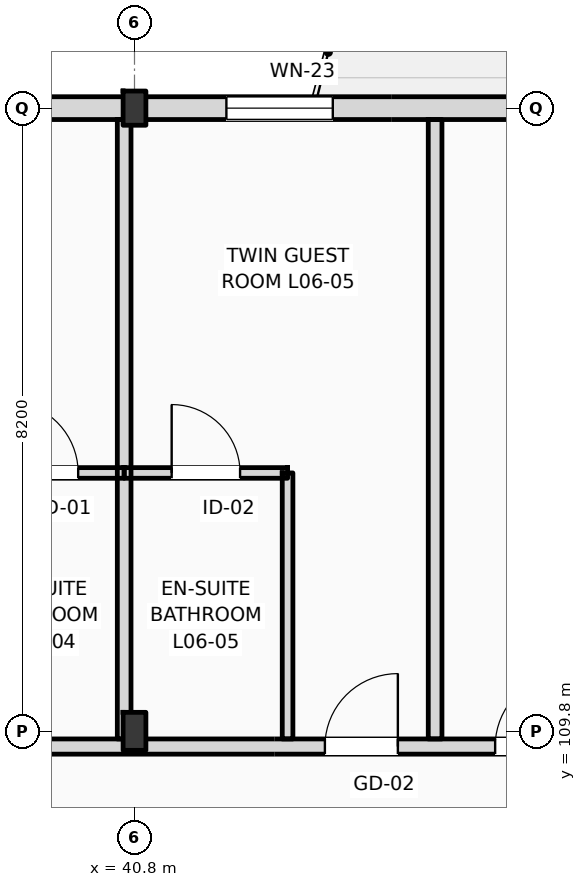
"""IFC4 building model, lengths in metres.
Left out: names, types, materials, properties, quantities, classifications, styles, units other than length and angle.
Written with IfcOpenShell. Run it as: python <this file> out.ifc"""

import sys

from ifc_helpers import new_model, si_unit, direction, frame, frame_2d, origin, origin_2d, place, context, subcontext, project, spatial, rectangle, i_section, extrude, element, fill, save


model = new_model("IFC4")
c1 = context("Model", 3, precision=1e-05, world=origin(), true_north=direction((0.0, 1.0)))
c2 = subcontext(c1, "Body", "Model", "MODEL_VIEW")
j1 = project(units=[si_unit("LENGTHUNIT", "METRE"), si_unit("PLANEANGLEUNIT", "RADIAN")], contexts=[c1])
p1 = place(None, origin())
s1 = spatial("IfcSite", under=j1, at=p1, CompositionType="ELEMENT")
p2 = place(p1, origin())
s2 = spatial("IfcBuilding", under=s1, at=p2, CompositionType="ELEMENT")
p3 = place(p2, frame((0.0, 0.0, 28.2)))
s3 = spatial("IfcBuildingStorey", under=s2, at=p3, CompositionType="ELEMENT", Elevation=28.2)
p4 = place(p3, frame((40.8, 109.8, 0.0), z_axis=(0.0, 0.0, 1.0), x_axis=(1.0, 0.0, 0.0)))
e1 = element("IfcColumn", 1, at=p4, inside=s3, PredefinedType="COLUMN", context=c2, shape_type="SweptSolid", body=[
    extrude(i_section(OverallWidth=0.3, OverallDepth=0.5, WebThickness=0.014, FlangeThickness=0.028, FilletRadius=0.027, at=origin_2d()), origin(), (0.0, 0.0, 1.0), 3.6),
])
p5 = place(p3, frame((40.8, 118.0, 0.0), z_axis=(0.0, 0.0, 1.0), x_axis=(1.0, 0.0, 0.0)))
e2 = element("IfcColumn", 2, at=p5, inside=s3, PredefinedType="COLUMN", context=c2, shape_type="SweptSolid", body=[
    extrude(i_section(OverallWidth=0.3, OverallDepth=0.45, WebThickness=0.014, FlangeThickness=0.026, FilletRadius=0.027, at=origin_2d()), origin(), (0.0, 0.0, 1.0), 3.6),
])
p6 = place(p3, frame((22.5, 118.0, 0.0), z_axis=(0.0, 0.0, 1.0), x_axis=(1.0, 0.0, 0.0)))
e3 = element("IfcWall", 3, at=p6, inside=s3, PredefinedType="STANDARD", context=c2, shape_type="SweptSolid", body=[
    extrude(rectangle(XDim=97.5, YDim=0.3, at=frame_2d((48.75, 0.0))), origin(), (0.0, 0.0, 1.0), 2.8),
])
p7 = place(p6, frame((0.91, 0.0, 0.9)))
e4 = element("IfcOpeningElement", 4, at=p7, cuts=e3, PredefinedType="OPENING", context=c2, shape_type="SweptSolid", body=[
    extrude(rectangle(XDim=0.9, YDim=1.72, at=frame_2d((0.45, 0.86))), frame((0.0, 0.16, 0.0), z_axis=(0.0, -1.0, 0.0), x_axis=(1.0, 0.0, 0.0)), (0.0, 0.0, 1.0), 0.32),
])
p8 = place(p6, frame((6.561, 0.0, 0.0)))
e5 = element("IfcOpeningElement", 5, at=p8, cuts=e3, PredefinedType="OPENING", context=c2, shape_type="SweptSolid", body=[
    extrude(rectangle(XDim=1.2, YDim=2.25, at=frame_2d((0.6, 1.125))), frame((0.0, 0.16, 0.0), z_axis=(0.0, -1.0, 0.0), x_axis=(1.0, 0.0, 0.0)), (0.0, 0.0, 1.0), 0.32),
])
p9 = place(p6, frame((11.477, 0.0, 0.9)))
e6 = element("IfcOpeningElement", 6, at=p9, cuts=e3, PredefinedType="OPENING", context=c2, shape_type="SweptSolid", body=[
    extrude(rectangle(XDim=1.1, YDim=1.5, at=frame_2d((0.55, 0.75))), frame((0.0, 0.16, 0.0), z_axis=(0.0, -1.0, 0.0), x_axis=(1.0, 0.0, 0.0)), (0.0, 0.0, 1.0), 0.32),
])
p10 = place(p6, frame((15.194, 0.0, 0.9)))
e7 = element("IfcOpeningElement", 7, at=p10, cuts=e3, PredefinedType="OPENING", context=c2, shape_type="SweptSolid", body=[
    extrude(rectangle(XDim=1.25, YDim=1.6, at=frame_2d((0.625, 0.8))), frame((0.0, 0.16, 0.0), z_axis=(0.0, -1.0, 0.0), x_axis=(1.0, 0.0, 0.0)), (0.0, 0.0, 1.0), 0.32),
])
p11 = place(p6, frame((19.509, 0.0, 0.9)))
e8 = element("IfcOpeningElement", 8, at=p11, cuts=e3, PredefinedType="OPENING", context=c2, shape_type="SweptSolid", body=[
    extrude(rectangle(XDim=1.4, YDim=1.7, at=frame_2d((0.7, 0.85))), frame((0.0, 0.16, 0.0), z_axis=(0.0, -1.0, 0.0), x_axis=(1.0, 0.0, 0.0)), (0.0, 0.0, 1.0), 0.32),
])
p12 = place(p6, frame((23.258, 0.0, 0.0)))
e9 = element("IfcOpeningElement", 9, at=p12, cuts=e3, PredefinedType="OPENING", context=c2, shape_type="SweptSolid", body=[
    extrude(rectangle(XDim=1.2, YDim=2.25, at=frame_2d((0.6, 1.125))), frame((0.0, 0.16, 0.0), z_axis=(0.0, -1.0, 0.0), x_axis=(1.0, 0.0, 0.0)), (0.0, 0.0, 1.0), 0.32),
])
p13 = place(p6, frame((28.115, 0.0, 0.9)))
e10 = element("IfcOpeningElement", 10, at=p13, cuts=e3, PredefinedType="OPENING", context=c2, shape_type="SweptSolid", body=[
    extrude(rectangle(XDim=1.75, YDim=1.72, at=frame_2d((0.875, 0.86))), frame((0.0, 0.16, 0.0), z_axis=(0.0, -1.0, 0.0), x_axis=(1.0, 0.0, 0.0)), (0.0, 0.0, 1.0), 0.32),
])
p14 = place(p6, frame((31.582, 0.0, 0.9)))
e11 = element("IfcOpeningElement", 11, at=p14, cuts=e3, PredefinedType="OPENING", context=c2, shape_type="SweptSolid", body=[
    extrude(rectangle(XDim=1.35, YDim=1.72, at=frame_2d((0.675, 0.86))), frame((0.0, 0.16, 0.0), z_axis=(0.0, -1.0, 0.0), x_axis=(1.0, 0.0, 0.0)), (0.0, 0.0, 1.0), 0.32),
])
p15 = place(p6, frame((37.379, 0.0, 0.0)))
e12 = element("IfcOpeningElement", 12, at=p15, cuts=e3, PredefinedType="OPENING", context=c2, shape_type="SweptSolid", body=[
    extrude(rectangle(XDim=1.2, YDim=2.25, at=frame_2d((0.6, 1.125))), frame((0.0, 0.16, 0.0), z_axis=(0.0, -1.0, 0.0), x_axis=(1.0, 0.0, 0.0)), (0.0, 0.0, 1.0), 0.32),
])
p16 = place(p6, frame((42.663, 0.0, 0.9)))
e13 = element("IfcOpeningElement", 13, at=p16, cuts=e3, PredefinedType="OPENING", context=c2, shape_type="SweptSolid", body=[
    extrude(rectangle(XDim=1.35, YDim=1.72, at=frame_2d((0.675, 0.86))), frame((0.0, 0.16, 0.0), z_axis=(0.0, -1.0, 0.0), x_axis=(1.0, 0.0, 0.0)), (0.0, 0.0, 1.0), 0.32),
])
p17 = place(p6, frame((45.119, 0.0, 0.9)))
e14 = element("IfcOpeningElement", 14, at=p17, cuts=e3, PredefinedType="OPENING", context=c2, shape_type="SweptSolid", body=[
    extrude(rectangle(XDim=2.871, YDim=1.72, at=frame_2d((1.436, 0.86))), frame((0.0, 0.16, 0.0), z_axis=(0.0, -1.0, 0.0), x_axis=(1.0, 0.0, 0.0)), (0.0, 0.0, 1.0), 0.32),
])
p18 = place(p6, frame((50.41, 0.0, 0.9)))
e15 = element("IfcOpeningElement", 15, at=p18, cuts=e3, PredefinedType="OPENING", context=c2, shape_type="SweptSolid", body=[
    extrude(rectangle(XDim=1.8, YDim=1.72, at=frame_2d((0.9, 0.86))), frame((0.0, 0.16, 0.0), z_axis=(0.0, -1.0, 0.0), x_axis=(1.0, 0.0, 0.0)), (0.0, 0.0, 1.0), 0.32),
])
p19 = place(p6, frame((54.375, 0.0, 0.0)))
e16 = element("IfcOpeningElement", 16, at=p19, cuts=e3, PredefinedType="OPENING", context=c2, shape_type="SweptSolid", body=[
    extrude(rectangle(XDim=1.2, YDim=2.25, at=frame_2d((0.6, 1.125))), frame((0.0, 0.16, 0.0), z_axis=(0.0, -1.0, 0.0), x_axis=(1.0, 0.0, 0.0)), (0.0, 0.0, 1.0), 0.32),
])
p20 = place(p6, frame((59.052, 0.0, 0.9)))
e17 = element("IfcOpeningElement", 17, at=p20, cuts=e3, PredefinedType="OPENING", context=c2, shape_type="SweptSolid", body=[
    extrude(rectangle(XDim=1.35, YDim=1.72, at=frame_2d((0.675, 0.86))), frame((0.0, 0.16, 0.0), z_axis=(0.0, -1.0, 0.0), x_axis=(1.0, 0.0, 0.0)), (0.0, 0.0, 1.0), 0.32),
])
p21 = place(p6, frame((62.768, 0.0, 0.9)))
e18 = element("IfcOpeningElement", 18, at=p21, cuts=e3, PredefinedType="OPENING", context=c2, shape_type="SweptSolid", body=[
    extrude(rectangle(XDim=1.5, YDim=1.72, at=frame_2d((0.75, 0.86))), frame((0.0, 0.16, 0.0), z_axis=(0.0, -1.0, 0.0), x_axis=(1.0, 0.0, 0.0)), (0.0, 0.0, 1.0), 0.32),
])
p22 = place(p6, frame((68.498, 0.0, 0.0)))
e19 = element("IfcOpeningElement", 19, at=p22, cuts=e3, PredefinedType="OPENING", context=c2, shape_type="SweptSolid", body=[
    extrude(rectangle(XDim=1.2, YDim=2.25, at=frame_2d((0.6, 1.125))), frame((0.0, 0.16, 0.0), z_axis=(0.0, -1.0, 0.0), x_axis=(1.0, 0.0, 0.0)), (0.0, 0.0, 1.0), 0.32),
])
p23 = place(p6, frame((71.265, 0.0, 0.9)))
e20 = element("IfcOpeningElement", 20, at=p23, cuts=e3, PredefinedType="OPENING", context=c2, shape_type="SweptSolid", body=[
    extrude(rectangle(XDim=0.9, YDim=1.72, at=frame_2d((0.45, 0.86))), frame((0.0, 0.16, 0.0), z_axis=(0.0, -1.0, 0.0), x_axis=(1.0, 0.0, 0.0)), (0.0, 0.0, 1.0), 0.32),
])
p24 = place(p6, frame((76.316, 0.0, 0.9)))
e21 = element("IfcOpeningElement", 21, at=p24, cuts=e3, PredefinedType="OPENING", context=c2, shape_type="SweptSolid", body=[
    extrude(rectangle(XDim=1.95, YDim=1.72, at=frame_2d((0.975, 0.86))), frame((0.0, 0.16, 0.0), z_axis=(0.0, -1.0, 0.0), x_axis=(1.0, 0.0, 0.0)), (0.0, 0.0, 1.0), 0.32),
])
p25 = place(p6, frame((81.632, 0.0, 0.9)))
e22 = element("IfcOpeningElement", 22, at=p25, cuts=e3, PredefinedType="OPENING", context=c2, shape_type="SweptSolid", body=[
    extrude(rectangle(XDim=1.35, YDim=1.72, at=frame_2d((0.675, 0.86))), frame((0.0, 0.16, 0.0), z_axis=(0.0, -1.0, 0.0), x_axis=(1.0, 0.0, 0.0)), (0.0, 0.0, 1.0), 0.32),
])
p26 = place(p6, frame((84.948, 0.0, 0.9)))
e23 = element("IfcOpeningElement", 23, at=p26, cuts=e3, PredefinedType="OPENING", context=c2, shape_type="SweptSolid", body=[
    extrude(rectangle(XDim=2.25, YDim=1.72, at=frame_2d((1.125, 0.86))), frame((0.0, 0.16, 0.0), z_axis=(0.0, -1.0, 0.0), x_axis=(1.0, 0.0, 0.0)), (0.0, 0.0, 1.0), 0.32),
])
p27 = place(p6, frame((90.063, 0.0, 0.9)))
e24 = element("IfcOpeningElement", 24, at=p27, cuts=e3, PredefinedType="OPENING", context=c2, shape_type="SweptSolid", body=[
    extrude(rectangle(XDim=1.8, YDim=1.72, at=frame_2d((0.9, 0.86))), frame((0.0, 0.16, 0.0), z_axis=(0.0, -1.0, 0.0), x_axis=(1.0, 0.0, 0.0)), (0.0, 0.0, 1.0), 0.32),
])
p28 = place(p6, frame((93.529, 0.0, 0.9)))
e25 = element("IfcOpeningElement", 25, at=p28, cuts=e3, PredefinedType="OPENING", context=c2, shape_type="SweptSolid", body=[
    extrude(rectangle(XDim=2.55, YDim=1.72, at=frame_2d((1.275, 0.86))), frame((0.0, 0.16, 0.0), z_axis=(0.0, -1.0, 0.0), x_axis=(1.0, 0.0, 0.0)), (0.0, 0.0, 1.0), 0.32),
])
p29 = place(p3, frame((10.65, 109.6, 0.0), z_axis=(0.0, 0.0, 1.0), x_axis=(1.0, 0.0, 0.0)))
e26 = element("IfcWall", 26, at=p29, inside=s3, PredefinedType="PARTITIONING", context=c2, shape_type="SweptSolid", body=[
    extrude(rectangle(XDim=109.21, YDim=0.2, at=frame_2d((54.605, 0.0))), origin(), (0.0, 0.0, 1.0), 2.8),
])
p30 = place(p29, frame((12.611, 0.0, 0.0)))
e27 = element("IfcOpeningElement", 27, at=p30, cuts=e26, PredefinedType="OPENING", context=c2, shape_type="SweptSolid", body=[
    extrude(rectangle(XDim=1.02, YDim=2.2, at=frame_2d((0.51, 1.1))), frame((0.0, 0.11, 0.0), z_axis=(0.0, -1.0, 0.0), x_axis=(1.0, 0.0, 0.0)), (0.0, 0.0, 1.0), 0.22),
])
p31 = place(p29, frame((19.451, 0.0, 0.0)))
e28 = element("IfcOpeningElement", 28, at=p31, cuts=e26, PredefinedType="OPENING", context=c2, shape_type="SweptSolid", body=[
    extrude(rectangle(XDim=1.02, YDim=2.2, at=frame_2d((0.51, 1.1))), frame((0.0, 0.11, 0.0), z_axis=(0.0, -1.0, 0.0), x_axis=(1.0, 0.0, 0.0)), (0.0, 0.0, 1.0), 0.22),
])
p32 = place(p29, frame((23.842, 0.0, 0.0)))
e29 = element("IfcOpeningElement", 29, at=p32, cuts=e26, PredefinedType="OPENING", context=c2, shape_type="SweptSolid", body=[
    extrude(rectangle(XDim=1.02, YDim=2.2, at=frame_2d((0.51, 1.1))), frame((0.0, 0.11, 0.0), z_axis=(0.0, -1.0, 0.0), x_axis=(1.0, 0.0, 0.0)), (0.0, 0.0, 1.0), 0.22),
])
p33 = place(p29, frame((26.084, 0.0, 0.0)))
e30 = element("IfcOpeningElement", 30, at=p33, cuts=e26, PredefinedType="OPENING", context=c2, shape_type="SweptSolid", body=[
    extrude(rectangle(XDim=1.02, YDim=2.2, at=frame_2d((0.51, 1.1))), frame((0.0, 0.11, 0.0), z_axis=(0.0, -1.0, 0.0), x_axis=(1.0, 0.0, 0.0)), (0.0, 0.0, 1.0), 0.22),
])
p34 = place(p29, frame((32.655, 0.0, 0.0)))
e31 = element("IfcOpeningElement", 31, at=p34, cuts=e26, PredefinedType="OPENING", context=c2, shape_type="SweptSolid", body=[
    extrude(rectangle(XDim=0.96, YDim=2.2, at=frame_2d((0.48, 1.1))), frame((0.0, 0.11, 0.0), z_axis=(0.0, -1.0, 0.0), x_axis=(1.0, 0.0, 0.0)), (0.0, 0.0, 1.0), 0.22),
])
p35 = place(p29, frame((34.895, 0.0, 0.0)))
e32 = element("IfcOpeningElement", 32, at=p35, cuts=e26, PredefinedType="OPENING", context=c2, shape_type="SweptSolid", body=[
    extrude(rectangle(XDim=0.96, YDim=2.2, at=frame_2d((0.48, 1.1))), frame((0.0, 0.11, 0.0), z_axis=(0.0, -1.0, 0.0), x_axis=(1.0, 0.0, 0.0)), (0.0, 0.0, 1.0), 0.22),
])
p36 = place(p29, frame((41.436, 0.0, 0.0)))
e33 = element("IfcOpeningElement", 33, at=p36, cuts=e26, PredefinedType="OPENING", context=c2, shape_type="SweptSolid", body=[
    extrude(rectangle(XDim=0.96, YDim=2.2, at=frame_2d((0.48, 1.1))), frame((0.0, 0.11, 0.0), z_axis=(0.0, -1.0, 0.0), x_axis=(1.0, 0.0, 0.0)), (0.0, 0.0, 1.0), 0.22),
])
p37 = place(p29, frame((43.427, 0.0, 0.0)))
e34 = element("IfcOpeningElement", 34, at=p37, cuts=e26, PredefinedType="OPENING", context=c2, shape_type="SweptSolid", body=[
    extrude(rectangle(XDim=0.96, YDim=2.2, at=frame_2d((0.48, 1.1))), frame((0.0, 0.11, 0.0), z_axis=(0.0, -1.0, 0.0), x_axis=(1.0, 0.0, 0.0)), (0.0, 0.0, 1.0), 0.22),
])
p38 = place(p29, frame((50.218, 0.0, 0.0)))
e35 = element("IfcOpeningElement", 35, at=p38, cuts=e26, PredefinedType="OPENING", context=c2, shape_type="SweptSolid", body=[
    extrude(rectangle(XDim=0.96, YDim=2.2, at=frame_2d((0.48, 1.1))), frame((0.0, 0.11, 0.0), z_axis=(0.0, -1.0, 0.0), x_axis=(1.0, 0.0, 0.0)), (0.0, 0.0, 1.0), 0.22),
])
p39 = place(p29, frame((54.859, 0.0, 0.0)))
e36 = element("IfcOpeningElement", 36, at=p39, cuts=e26, PredefinedType="OPENING", context=c2, shape_type="SweptSolid", body=[
    extrude(rectangle(XDim=0.96, YDim=2.2, at=frame_2d((0.48, 1.1))), frame((0.0, 0.11, 0.0), z_axis=(0.0, -1.0, 0.0), x_axis=(1.0, 0.0, 0.0)), (0.0, 0.0, 1.0), 0.22),
])
p40 = place(p29, frame((59.0, 0.0, 0.0)))
e37 = element("IfcOpeningElement", 37, at=p40, cuts=e26, PredefinedType="OPENING", context=c2, shape_type="SweptSolid", body=[
    extrude(rectangle(XDim=0.96, YDim=2.2, at=frame_2d((0.48, 1.1))), frame((0.0, 0.11, 0.0), z_axis=(0.0, -1.0, 0.0), x_axis=(1.0, 0.0, 0.0)), (0.0, 0.0, 1.0), 0.22),
])
p41 = place(p29, frame((63.39, 0.0, 0.0)))
e38 = element("IfcOpeningElement", 38, at=p41, cuts=e26, PredefinedType="OPENING", context=c2, shape_type="SweptSolid", body=[
    extrude(rectangle(XDim=0.96, YDim=2.2, at=frame_2d((0.48, 1.1))), frame((0.0, 0.11, 0.0), z_axis=(0.0, -1.0, 0.0), x_axis=(1.0, 0.0, 0.0)), (0.0, 0.0, 1.0), 0.22),
])
p42 = place(p29, frame((65.631, 0.0, 0.0)))
e39 = element("IfcOpeningElement", 39, at=p42, cuts=e26, PredefinedType="OPENING", context=c2, shape_type="SweptSolid", body=[
    extrude(rectangle(XDim=0.96, YDim=2.2, at=frame_2d((0.48, 1.1))), frame((0.0, 0.11, 0.0), z_axis=(0.0, -1.0, 0.0), x_axis=(1.0, 0.0, 0.0)), (0.0, 0.0, 1.0), 0.22),
])
p43 = place(p29, frame((72.172, 0.0, 0.0)))
e40 = element("IfcOpeningElement", 40, at=p43, cuts=e26, PredefinedType="OPENING", context=c2, shape_type="SweptSolid", body=[
    extrude(rectangle(XDim=0.96, YDim=2.2, at=frame_2d((0.48, 1.1))), frame((0.0, 0.11, 0.0), z_axis=(0.0, -1.0, 0.0), x_axis=(1.0, 0.0, 0.0)), (0.0, 0.0, 1.0), 0.22),
])
p44 = place(p29, frame((74.413, 0.0, 0.0)))
e41 = element("IfcOpeningElement", 41, at=p44, cuts=e26, PredefinedType="OPENING", context=c2, shape_type="SweptSolid", body=[
    extrude(rectangle(XDim=0.96, YDim=2.2, at=frame_2d((0.48, 1.1))), frame((0.0, 0.11, 0.0), z_axis=(0.0, -1.0, 0.0), x_axis=(1.0, 0.0, 0.0)), (0.0, 0.0, 1.0), 0.22),
])
p45 = place(p29, frame((80.954, 0.0, 0.0)))
e42 = element("IfcOpeningElement", 42, at=p45, cuts=e26, PredefinedType="OPENING", context=c2, shape_type="SweptSolid", body=[
    extrude(rectangle(XDim=0.96, YDim=2.2, at=frame_2d((0.48, 1.1))), frame((0.0, 0.11, 0.0), z_axis=(0.0, -1.0, 0.0), x_axis=(1.0, 0.0, 0.0)), (0.0, 0.0, 1.0), 0.22),
])
p46 = place(p29, frame((83.195, 0.0, 0.0)))
e43 = element("IfcOpeningElement", 43, at=p46, cuts=e26, PredefinedType="OPENING", context=c2, shape_type="SweptSolid", body=[
    extrude(rectangle(XDim=0.96, YDim=2.2, at=frame_2d((0.48, 1.1))), frame((0.0, 0.11, 0.0), z_axis=(0.0, -1.0, 0.0), x_axis=(1.0, 0.0, 0.0)), (0.0, 0.0, 1.0), 0.22),
])
p47 = place(p29, frame((89.735, 0.0, 0.0)))
e44 = element("IfcOpeningElement", 44, at=p47, cuts=e26, PredefinedType="OPENING", context=c2, shape_type="SweptSolid", body=[
    extrude(rectangle(XDim=0.96, YDim=2.2, at=frame_2d((0.48, 1.1))), frame((0.0, 0.11, 0.0), z_axis=(0.0, -1.0, 0.0), x_axis=(1.0, 0.0, 0.0)), (0.0, 0.0, 1.0), 0.22),
])
p48 = place(p29, frame((94.126, 0.0, 0.0)))
e45 = element("IfcOpeningElement", 45, at=p48, cuts=e26, PredefinedType="OPENING", context=c2, shape_type="SweptSolid", body=[
    extrude(rectangle(XDim=0.96, YDim=2.2, at=frame_2d((0.48, 1.1))), frame((0.0, 0.11, 0.0), z_axis=(0.0, -1.0, 0.0), x_axis=(1.0, 0.0, 0.0)), (0.0, 0.0, 1.0), 0.22),
])
p49 = place(p29, frame((98.517, 0.0, 0.0)))
e46 = element("IfcOpeningElement", 46, at=p49, cuts=e26, PredefinedType="OPENING", context=c2, shape_type="SweptSolid", body=[
    extrude(rectangle(XDim=0.96, YDim=2.2, at=frame_2d((0.48, 1.1))), frame((0.0, 0.11, 0.0), z_axis=(0.0, -1.0, 0.0), x_axis=(1.0, 0.0, 0.0)), (0.0, 0.0, 1.0), 0.22),
])
p50 = place(p29, frame((102.908, 0.0, 0.0)))
e47 = element("IfcOpeningElement", 47, at=p50, cuts=e26, PredefinedType="OPENING", context=c2, shape_type="SweptSolid", body=[
    extrude(rectangle(XDim=0.96, YDim=2.2, at=frame_2d((0.48, 1.1))), frame((0.0, 0.11, 0.0), z_axis=(0.0, -1.0, 0.0), x_axis=(1.0, 0.0, 0.0)), (0.0, 0.0, 1.0), 0.22),
])
p51 = place(p29, frame((105.099, 0.0, 0.0)))
e48 = element("IfcOpeningElement", 48, at=p51, cuts=e26, PredefinedType="OPENING", context=c2, shape_type="SweptSolid", body=[
    extrude(rectangle(XDim=0.96, YDim=2.2, at=frame_2d((0.48, 1.1))), frame((0.0, 0.11, 0.0), z_axis=(0.0, -1.0, 0.0), x_axis=(1.0, 0.0, 0.0)), (0.0, 0.0, 1.0), 0.22),
])
p52 = place(p29, frame((2.716, 0.0, 0.0)))
e49 = element("IfcOpeningElement", 49, at=p52, cuts=e26, PredefinedType="OPENING", context=c2, shape_type="SweptSolid", body=[
    extrude(rectangle(XDim=1.35, YDim=2.25, at=frame_2d((0.675, 1.125))), frame((0.0, 0.11, 0.0), z_axis=(0.0, -1.0, 0.0), x_axis=(1.0, 0.0, 0.0)), (0.0, 0.0, 1.0), 0.22),
])
p53 = place(p29, frame((6.65, 0.0, 0.0)))
e50 = element("IfcOpeningElement", 50, at=p53, cuts=e26, PredefinedType="OPENING", context=c2, shape_type="SweptSolid", body=[
    extrude(rectangle(XDim=1.35, YDim=2.25, at=frame_2d((0.675, 1.125))), frame((0.0, 0.11, 0.0), z_axis=(0.0, -1.0, 0.0), x_axis=(1.0, 0.0, 0.0)), (0.0, 0.0, 1.0), 0.22),
])
p54 = place(p29, frame((10.583, 0.0, 0.0)))
e51 = element("IfcOpeningElement", 51, at=p54, cuts=e26, PredefinedType="OPENING", context=c2, shape_type="SweptSolid", body=[
    extrude(rectangle(XDim=1.35, YDim=2.25, at=frame_2d((0.675, 1.125))), frame((0.0, 0.11, 0.0), z_axis=(0.0, -1.0, 0.0), x_axis=(1.0, 0.0, 0.0)), (0.0, 0.0, 1.0), 0.22),
])
p55 = place(p3, frame((40.664, 109.7, 0.0), z_axis=(0.0, 0.0, 1.0), x_axis=(0.0, 1.0, 0.0)))
e52 = element("IfcWall", 52, at=p55, inside=s3, PredefinedType="PARTITIONING", context=c2, shape_type="SweptSolid", body=[
    extrude(rectangle(XDim=8.15, YDim=0.18, at=frame_2d((4.075, 0.0))), origin(), (0.0, 0.0, 1.0), 2.99),
])
p56 = place(p3, frame((38.514, 113.2, 0.0), z_axis=(0.0, 0.0, 1.0), x_axis=(1.0, 0.0, 0.0)))
e53 = element("IfcWall", 53, at=p56, inside=s3, PredefinedType="PARTITIONING", context=c2, shape_type="SweptSolid", body=[
    extrude(rectangle(XDim=2.15, YDim=0.14, at=frame_2d((1.075, 0.0))), origin(), (0.0, 0.0, 1.0), 3.36),
])
p57 = place(p56, frame((0.605, 0.0, 0.0)))
e54 = element("IfcOpeningElement", 54, at=p57, cuts=e53, PredefinedType="OPENING", context=c2, shape_type="SweptSolid", body=[
    extrude(rectangle(XDim=0.94, YDim=2.15, at=frame_2d((0.47, 1.075))), frame((0.0, 0.08, 0.0), z_axis=(0.0, -1.0, 0.0), x_axis=(1.0, 0.0, 0.0)), (0.0, 0.0, 1.0), 0.16),
])
p58 = place(p3, frame((44.755, 109.7, 0.0), z_axis=(0.0, 0.0, 1.0), x_axis=(0.0, 1.0, 0.0)))
e55 = element("IfcWall", 55, at=p58, inside=s3, PredefinedType="PARTITIONING", context=c2, shape_type="SweptSolid", body=[
    extrude(rectangle(XDim=8.15, YDim=0.18, at=frame_2d((4.075, 0.0))), origin(), (0.0, 0.0, 1.0), 3.36),
])
p59 = place(p3, frame((42.814, 109.7, 0.0), z_axis=(0.0, 0.0, 1.0), x_axis=(0.0, 1.0, 0.0)))
e56 = element("IfcWall", 56, at=p59, inside=s3, PredefinedType="PARTITIONING", context=c2, shape_type="SweptSolid", body=[
    extrude(rectangle(XDim=3.5, YDim=0.14, at=frame_2d((1.75, 0.0))), origin(), (0.0, 0.0, 1.0), 3.36),
])
p60 = place(p3, frame((40.664, 113.2, 0.0), z_axis=(0.0, 0.0, 1.0), x_axis=(1.0, 0.0, 0.0)))
e57 = element("IfcWall", 57, at=p60, inside=s3, PredefinedType="PARTITIONING", context=c2, shape_type="SweptSolid", body=[
    extrude(rectangle(XDim=2.15, YDim=0.14, at=frame_2d((1.075, 0.0))), origin(), (0.0, 0.0, 1.0), 3.36),
])
p61 = place(p60, frame((0.625, 0.0, 0.0)))
e58 = element("IfcOpeningElement", 58, at=p61, cuts=e57, PredefinedType="OPENING", context=c2, shape_type="SweptSolid", body=[
    extrude(rectangle(XDim=0.9, YDim=2.1, at=frame_2d((0.45, 1.05))), frame((0.0, 0.08, 0.0), z_axis=(0.0, -1.0, 0.0), x_axis=(1.0, 0.0, 0.0)), (0.0, 0.0, 1.0), 0.16),
])
p62 = place(p11, origin())
e59 = element("IfcWindow", 59, at=p62, inside=s3, PartitioningType="DOUBLE_PANEL_VERTICAL", PredefinedType="WINDOW", context=c2, shape_type="SweptSolid", body=[
    extrude(rectangle(XDim=1.4, YDim=1.7, at=frame_2d((0.7, 0.85))), frame((0.0, 0.03, 0.0), z_axis=(0.0, -1.0, 0.0), x_axis=(1.0, 0.0, 0.0)), (0.0, 0.0, 1.0), 0.06),
])
fill(e8, e59)
p63 = place(p57, origin())
e60 = element("IfcDoor", 60, at=p63, inside=s3, OperationType="SINGLE_SWING_LEFT", PredefinedType="DOOR", context=c2, shape_type="SweptSolid", body=[
    extrude(rectangle(XDim=0.94, YDim=2.15, at=frame_2d((0.47, 1.075))), frame((0.0, 0.025, 0.0), z_axis=(0.0, -1.0, 0.0), x_axis=(1.0, 0.0, 0.0)), (0.0, 0.0, 1.0), 0.05),
])
fill(e54, e60)
p64 = place(p34, origin())
e61 = element("IfcDoor", 61, at=p64, inside=s3, OperationType="SINGLE_SWING_RIGHT", PredefinedType="DOOR", context=c2, shape_type="SweptSolid", body=[
    extrude(rectangle(XDim=0.96, YDim=2.2, at=frame_2d((0.48, 1.1))), frame((0.0, 0.025, 0.0), z_axis=(0.0, -1.0, 0.0), x_axis=(1.0, 0.0, 0.0)), (0.0, 0.0, 1.0), 0.05),
])
fill(e31, e61)
p65 = place(p61, origin())
e62 = element("IfcDoor", 62, at=p65, inside=s3, OperationType="SINGLE_SWING_LEFT", PredefinedType="DOOR", context=c2, shape_type="SweptSolid", body=[
    extrude(rectangle(XDim=0.9, YDim=2.1, at=frame_2d((0.45, 1.05))), frame((0.0, 0.025, 0.0), z_axis=(0.0, -1.0, 0.0), x_axis=(1.0, 0.0, 0.0)), (0.0, 0.0, 1.0), 0.05),
])
fill(e58, e62)
p66 = place(p35, origin())
e63 = element("IfcDoor", 63, at=p66, inside=s3, OperationType="SINGLE_SWING_RIGHT", PredefinedType="DOOR", context=c2, shape_type="SweptSolid", body=[
    extrude(rectangle(XDim=0.96, YDim=2.2, at=frame_2d((0.48, 1.1))), frame((0.0, 0.025, 0.0), z_axis=(0.0, -1.0, 0.0), x_axis=(1.0, 0.0, 0.0)), (0.0, 0.0, 1.0), 0.05),
])
fill(e32, e63)
save(model, sys.argv[1])
